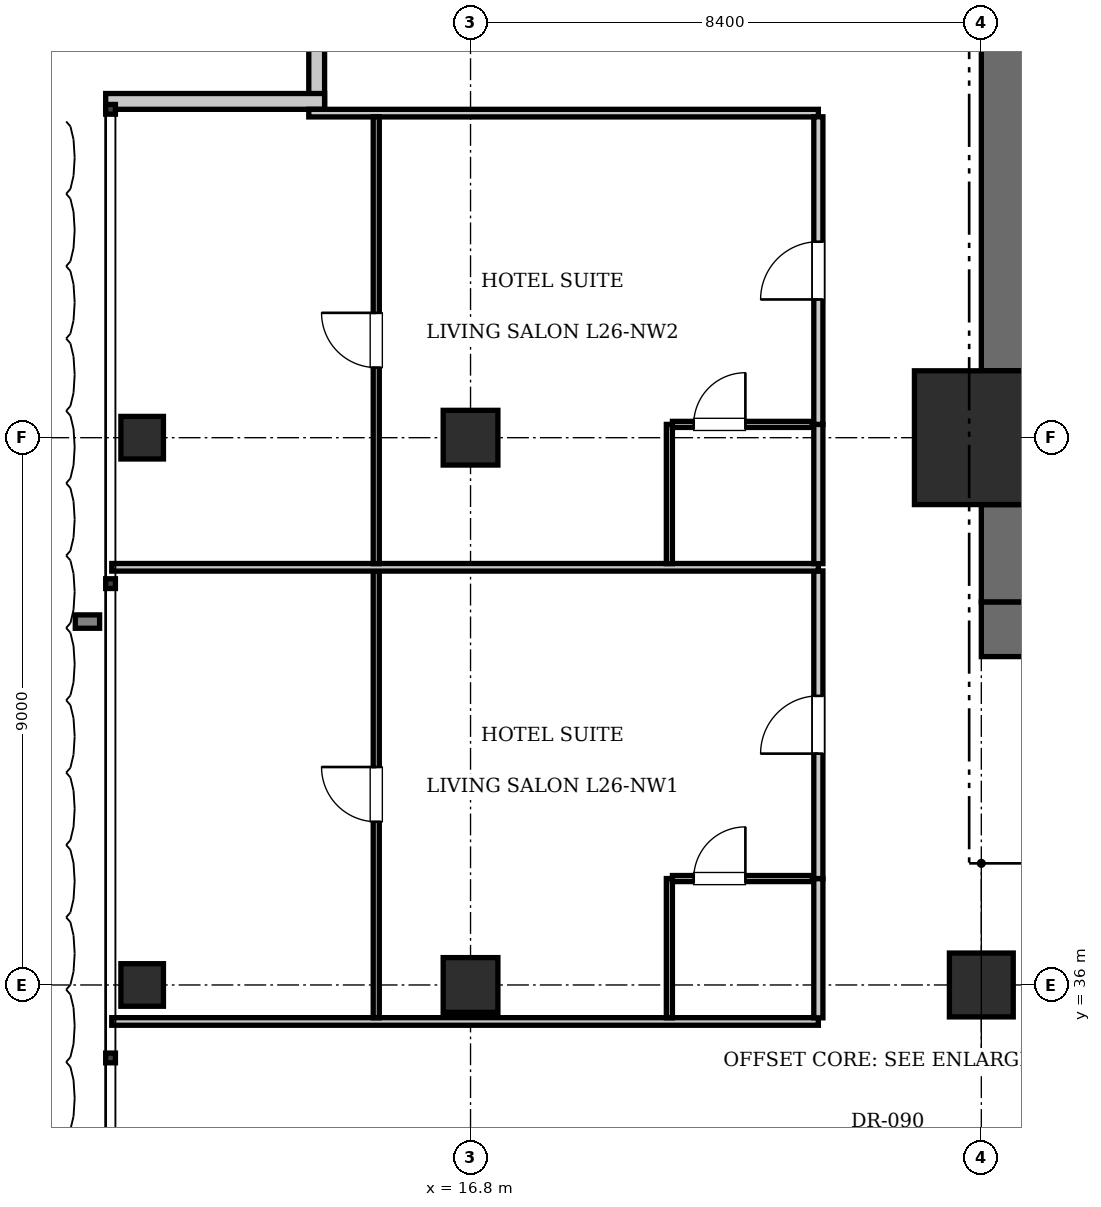
"""IFC4 building model, lengths in metres.
Left out: names, types, materials, properties, quantities, classifications, styles, units other than length and angle.
Written with IfcOpenShell. Run it as: python <this file> out.ifc"""

import sys

from ifc_helpers import new_model, si_unit, direction, frame, frame_2d, origin, origin_2d, place, context, subcontext, project, spatial, rectangle, i_section, extrude, element, fill, save


model = new_model("IFC4")
c1 = context("Model", 3, precision=1e-05, world=origin(), true_north=direction((0.0, 1.0)))
c2 = subcontext(c1, "Body", "Model", "MODEL_VIEW")
j1 = project(units=[si_unit("LENGTHUNIT", "METRE"), si_unit("PLANEANGLEUNIT", "RADIAN")], contexts=[c1])
p1 = place(None, origin())
s1 = spatial("IfcSite", under=j1, at=p1, CompositionType="ELEMENT")
p2 = place(p1, origin())
s2 = spatial("IfcBuilding", under=s1, at=p2, CompositionType="ELEMENT")
p3 = place(p2, frame((0.0, 0.0, 107.8)))
s3 = spatial("IfcBuildingStorey", under=s2, at=p3, CompositionType="ELEMENT", Elevation=107.8)
p4 = place(p3, frame((25.2, 45.0, 0.0), z_axis=(0.0, 0.0, 1.0), x_axis=(1.0, 0.0, 0.0)))
e1 = element("IfcColumn", 1, at=p4, inside=s3, PredefinedType="COLUMN", context=c2, shape_type="SweptSolid", body=[
    extrude(rectangle(XDim=2.2, YDim=2.2, at=origin_2d()), origin(), (0.0, 0.0, 1.0), 3.85),
])
p5 = place(p3, frame((25.2, 41.85, 0.0), z_axis=(0.0, 0.0, 1.0), x_axis=(1.0, 0.0, 0.0)))
e2 = element("IfcWall", 2, at=p5, inside=s3, PredefinedType="SHEAR", context=c2, shape_type="SweptSolid", body=[
    extrude(rectangle(XDim=6.8, YDim=0.9, at=frame_2d((3.4, 0.0))), origin(), (0.0, 0.0, 1.0), 3.85),
])
p6 = place(p5, frame((1.65, 0.0, 0.0)))
e3 = element("IfcOpeningElement", 3, at=p6, cuts=e2, PredefinedType="OPENING", context=c2, shape_type="SweptSolid", body=[
    extrude(rectangle(XDim=1.15, YDim=2.15, at=frame_2d((0.575, 1.075))), frame((0.0, 0.46, 0.0), z_axis=(0.0, -1.0, 0.0), x_axis=(1.0, 0.0, 0.0)), (0.0, 0.0, 1.0), 0.92),
])
p7 = place(p5, frame((5.15, 0.0, 0.0)))
e4 = element("IfcOpeningElement", 4, at=p7, cuts=e2, PredefinedType="OPENING", context=c2, shape_type="SweptSolid", body=[
    extrude(rectangle(XDim=1.1, YDim=2.2, at=frame_2d((0.55, 1.1))), frame((0.0, 0.46, 0.0), z_axis=(0.0, -1.0, 0.0), x_axis=(1.0, 0.0, 0.0)), (0.0, 0.0, 1.0), 0.92),
])
p8 = place(p3, frame((25.65, 42.3, 0.0), z_axis=(0.0, 0.0, 1.0), x_axis=(0.0, 1.0, 0.0)))
e5 = element("IfcWall", 5, at=p8, inside=s3, PredefinedType="SHEAR", context=c2, shape_type="SweptSolid", body=[
    extrude(rectangle(XDim=1.6, YDim=0.9, at=frame_2d((0.8, 0.0))), origin(), (0.0, 0.0, 1.0), 3.85),
])
p9 = place(p3, frame((25.65, 46.1, 0.0), z_axis=(0.0, 0.0, 1.0), x_axis=(0.0, 1.0, 0.0)))
e6 = element("IfcWall", 6, at=p9, inside=s3, PredefinedType="SHEAR", context=c2, shape_type="SweptSolid", body=[
    extrude(rectangle(XDim=7.0, YDim=0.9, at=frame_2d((3.5, 0.0))), origin(), (0.0, 0.0, 1.0), 3.85),
])
p10 = place(p3, frame((25.2, 36.0, 0.0), z_axis=(0.0, 0.0, 1.0), x_axis=(1.0, 0.0, 0.0)))
e7 = element("IfcColumn", 7, at=p10, inside=s3, PredefinedType="COLUMN", context=c2, shape_type="SweptSolid", body=[
    extrude(rectangle(XDim=1.05, YDim=1.05, at=origin_2d()), origin(), (0.0, 0.0, 1.0), 3.85),
])
for number, where, z_axis, x_axis in (
    (8, (16.8, 36.0, 0.0), (0.0, 0.0, 1.0), (1.0, 0.0, 0.0)),
    (9, (16.8, 45.0, 0.0), (0.0, 0.0, 1.0), (1.0, 0.0, 0.0)),
):
    element("IfcColumn", number, at=place(p3, frame(where, z_axis=z_axis, x_axis=x_axis)), inside=s3, PredefinedType="COLUMN", context=c2, shape_type="SweptSolid", body=[
        extrude(rectangle(XDim=0.9, YDim=0.9, at=origin_2d()), origin(), (0.0, 0.0, 1.0), 3.85),
    ])
for number, where, z_axis, x_axis in (
    (10, (11.4, 36.0, 0.0), (0.0, 0.0, 1.0), (1.0, 0.0, 0.0)),
    (11, (11.4, 45.0, 0.0), (0.0, 0.0, 1.0), (1.0, 0.0, 0.0)),
):
    element("IfcColumn", number, at=place(p3, frame(where, z_axis=z_axis, x_axis=x_axis)), inside=s3, PredefinedType="COLUMN", context=c2, shape_type="SweptSolid", body=[
        extrude(i_section(OverallWidth=0.7, OverallDepth=0.7, WebThickness=0.028, FlangeThickness=0.044, at=origin_2d()), origin(), (0.0, 0.0, 1.0), 3.85),
    ])
p11 = place(p3, frame((14.27, 50.4, 0.0), z_axis=(0.0, 0.0, 1.0), x_axis=(0.0, 1.0, 0.0)))
e12 = element("IfcWall", 12, at=p11, inside=s3, PredefinedType="SOLIDWALL", context=c2, shape_type="SweptSolid", body=[
    extrude(rectangle(XDim=3.6, YDim=0.26, at=frame_2d((1.8, 0.0))), origin(), (0.0, 0.0, 1.0), 3.61),
])
p12 = place(p3, frame((10.8, 50.53, 0.0), z_axis=(0.0, 0.0, 1.0), x_axis=(1.0, 0.0, 0.0)))
e13 = element("IfcWall", 13, at=p12, inside=s3, PredefinedType="SOLIDWALL", context=c2, shape_type="SweptSolid", body=[
    extrude(rectangle(XDim=3.6, YDim=0.26, at=frame_2d((1.8, 0.0))), origin(), (0.0, 0.0, 1.0), 3.61),
])
p13 = place(p3, frame((10.9, 35.4, 0.0), z_axis=(0.0, 0.0, 1.0), x_axis=(1.0, 0.0, 0.0)))
e14 = element("IfcWall", 14, at=p13, inside=s3, PredefinedType="PARTITIONING", context=c2, shape_type="SweptSolid", body=[
    extrude(rectangle(XDim=11.62, YDim=0.125, at=frame_2d((5.81, 0.0))), origin(), (0.0, 0.0, 1.0), 3.61),
])
p14 = place(p3, frame((14.14, 50.337, 0.0), z_axis=(0.0, 0.0, 1.0), x_axis=(1.0, 0.0, 0.0)))
e15 = element("IfcWall", 15, at=p14, inside=s3, PredefinedType="PARTITIONING", context=c2, shape_type="SweptSolid", body=[
    extrude(rectangle(XDim=8.38, YDim=0.125, at=frame_2d((4.19, 0.0))), origin(), (0.0, 0.0, 1.0), 3.61),
])
p15 = place(p3, frame((22.52, 35.46, 0.0), z_axis=(0.0, 0.0, 1.0), x_axis=(0.0, 1.0, 0.0)))
e16 = element("IfcWall", 16, at=p15, inside=s3, PredefinedType="PARTITIONING", context=c2, shape_type="SweptSolid", body=[
    extrude(rectangle(XDim=2.29, YDim=0.15, at=frame_2d((1.145, 0.0))), origin(), (0.0, 0.0, 1.0), 3.61),
])
p16 = place(p3, frame((22.52, 37.75, 0.0), z_axis=(0.0, 0.0, 1.0), x_axis=(0.0, 1.0, 0.0)))
e17 = element("IfcWall", 17, at=p16, inside=s3, PredefinedType="PARTITIONING", context=c2, shape_type="SweptSolid", body=[
    extrude(rectangle(XDim=5.059, YDim=0.15, at=frame_2d((2.529, 0.0))), origin(), (0.0, 0.0, 1.0), 3.61),
])
p17 = place(p16, frame((2.054, 0.0, 0.0)))
e18 = element("IfcOpeningElement", 18, at=p17, cuts=e17, PredefinedType="OPENING", context=c2, shape_type="SweptSolid", body=[
    extrude(rectangle(XDim=0.95, YDim=2.15, at=frame_2d((0.475, 1.075))), frame((0.0, 0.085, 0.0), z_axis=(0.0, -1.0, 0.0), x_axis=(1.0, 0.0, 0.0)), (0.0, 0.0, 1.0), 0.17),
])
p18 = place(p3, frame((20.07, 35.46, 0.0), z_axis=(0.0, 0.0, 1.0), x_axis=(0.0, 1.0, 0.0)))
e19 = element("IfcWall", 19, at=p18, inside=s3, PredefinedType="PARTITIONING", context=c2, shape_type="SweptSolid", body=[
    extrude(rectangle(XDim=2.29, YDim=0.1, at=frame_2d((1.145, 0.0))), origin(), (0.0, 0.0, 1.0), 3.61),
])
p19 = place(p3, frame((20.12, 37.75, 0.0), z_axis=(0.0, 0.0, 1.0), x_axis=(1.0, 0.0, 0.0)))
e20 = element("IfcWall", 20, at=p19, inside=s3, PredefinedType="PARTITIONING", context=c2, shape_type="SweptSolid", body=[
    extrude(rectangle(XDim=2.3, YDim=0.1, at=frame_2d((1.15, 0.0))), origin(), (0.0, 0.0, 1.0), 3.61),
])
p20 = place(p19, frame((0.35, 0.0, 0.0)))
e21 = element("IfcOpeningElement", 21, at=p20, cuts=e20, PredefinedType="OPENING", context=c2, shape_type="SweptSolid", body=[
    extrude(rectangle(XDim=0.85, YDim=2.1, at=frame_2d((0.425, 1.05))), frame((0.0, 0.06, 0.0), z_axis=(0.0, -1.0, 0.0), x_axis=(1.0, 0.0, 0.0)), (0.0, 0.0, 1.0), 0.12),
])
p21 = place(p3, frame((15.25, 35.46, 0.0), z_axis=(0.0, 0.0, 1.0), x_axis=(0.0, 1.0, 0.0)))
e22 = element("IfcWall", 22, at=p21, inside=s3, PredefinedType="PARTITIONING", context=c2, shape_type="SweptSolid", body=[
    extrude(rectangle(XDim=7.349, YDim=0.1, at=frame_2d((3.674, 0.0))), origin(), (0.0, 0.0, 1.0), 3.61),
])
p22 = place(p21, frame((3.224, 0.0, 0.0)))
e23 = element("IfcOpeningElement", 23, at=p22, cuts=e22, PredefinedType="OPENING", context=c2, shape_type="SweptSolid", body=[
    extrude(rectangle(XDim=0.9, YDim=2.1, at=frame_2d((0.45, 1.05))), frame((0.0, 0.06, 0.0), z_axis=(0.0, -1.0, 0.0), x_axis=(1.0, 0.0, 0.0)), (0.0, 0.0, 1.0), 0.12),
])
p23 = place(p3, frame((10.9, 42.869, 0.0), z_axis=(0.0, 0.0, 1.0), x_axis=(1.0, 0.0, 0.0)))
e24 = element("IfcWall", 24, at=p23, inside=s3, PredefinedType="PARTITIONING", context=c2, shape_type="SweptSolid", body=[
    extrude(rectangle(XDim=11.62, YDim=0.125, at=frame_2d((5.81, 0.0))), origin(), (0.0, 0.0, 1.0), 3.61),
])
p24 = place(p3, frame((22.52, 42.929, 0.0), z_axis=(0.0, 0.0, 1.0), x_axis=(0.0, 1.0, 0.0)))
e25 = element("IfcWall", 25, at=p24, inside=s3, PredefinedType="PARTITIONING", context=c2, shape_type="SweptSolid", body=[
    extrude(rectangle(XDim=2.29, YDim=0.15, at=frame_2d((1.145, 0.0))), origin(), (0.0, 0.0, 1.0), 3.61),
])
p25 = place(p3, frame((22.52, 45.219, 0.0), z_axis=(0.0, 0.0, 1.0), x_axis=(0.0, 1.0, 0.0)))
e26 = element("IfcWall", 26, at=p25, inside=s3, PredefinedType="PARTITIONING", context=c2, shape_type="SweptSolid", body=[
    extrude(rectangle(XDim=5.059, YDim=0.15, at=frame_2d((2.529, 0.0))), origin(), (0.0, 0.0, 1.0), 3.61),
])
p26 = place(p25, frame((2.054, 0.0, 0.0)))
e27 = element("IfcOpeningElement", 27, at=p26, cuts=e26, PredefinedType="OPENING", context=c2, shape_type="SweptSolid", body=[
    extrude(rectangle(XDim=0.95, YDim=2.15, at=frame_2d((0.475, 1.075))), frame((0.0, 0.085, 0.0), z_axis=(0.0, -1.0, 0.0), x_axis=(1.0, 0.0, 0.0)), (0.0, 0.0, 1.0), 0.17),
])
p27 = place(p3, frame((20.07, 42.929, 0.0), z_axis=(0.0, 0.0, 1.0), x_axis=(0.0, 1.0, 0.0)))
e28 = element("IfcWall", 28, at=p27, inside=s3, PredefinedType="PARTITIONING", context=c2, shape_type="SweptSolid", body=[
    extrude(rectangle(XDim=2.29, YDim=0.1, at=frame_2d((1.145, 0.0))), origin(), (0.0, 0.0, 1.0), 3.61),
])
p28 = place(p3, frame((20.12, 45.219, 0.0), z_axis=(0.0, 0.0, 1.0), x_axis=(1.0, 0.0, 0.0)))
e29 = element("IfcWall", 29, at=p28, inside=s3, PredefinedType="PARTITIONING", context=c2, shape_type="SweptSolid", body=[
    extrude(rectangle(XDim=2.3, YDim=0.1, at=frame_2d((1.15, 0.0))), origin(), (0.0, 0.0, 1.0), 3.61),
])
p29 = place(p28, frame((0.35, 0.0, 0.0)))
e30 = element("IfcOpeningElement", 30, at=p29, cuts=e29, PredefinedType="OPENING", context=c2, shape_type="SweptSolid", body=[
    extrude(rectangle(XDim=0.85, YDim=2.1, at=frame_2d((0.425, 1.05))), frame((0.0, 0.06, 0.0), z_axis=(0.0, -1.0, 0.0), x_axis=(1.0, 0.0, 0.0)), (0.0, 0.0, 1.0), 0.12),
])
p30 = place(p3, frame((15.25, 42.929, 0.0), z_axis=(0.0, 0.0, 1.0), x_axis=(0.0, 1.0, 0.0)))
e31 = element("IfcWall", 31, at=p30, inside=s3, PredefinedType="PARTITIONING", context=c2, shape_type="SweptSolid", body=[
    extrude(rectangle(XDim=7.349, YDim=0.1, at=frame_2d((3.674, 0.0))), origin(), (0.0, 0.0, 1.0), 3.61),
])
p31 = place(p30, frame((3.224, 0.0, 0.0)))
e32 = element("IfcOpeningElement", 32, at=p31, cuts=e31, PredefinedType="OPENING", context=c2, shape_type="SweptSolid", body=[
    extrude(rectangle(XDim=0.9, YDim=2.1, at=frame_2d((0.45, 1.05))), frame((0.0, 0.06, 0.0), z_axis=(0.0, -1.0, 0.0), x_axis=(1.0, 0.0, 0.0)), (0.0, 0.0, 1.0), 0.12),
])
p32 = place(p20, origin())
e33 = element("IfcDoor", 33, at=p32, inside=s3, OperationType="SINGLE_SWING_RIGHT", PredefinedType="DOOR", context=c2, shape_type="SweptSolid", body=[
    extrude(rectangle(XDim=0.85, YDim=2.1, at=frame_2d((0.425, 1.05))), frame((0.0, 0.025, 0.0), z_axis=(0.0, -1.0, 0.0), x_axis=(1.0, 0.0, 0.0)), (0.0, 0.0, 1.0), 0.05),
])
fill(e21, e33)
p33 = place(p17, origin())
e34 = element("IfcDoor", 34, at=p33, inside=s3, OperationType="SINGLE_SWING_LEFT", PredefinedType="DOOR", context=c2, shape_type="SweptSolid", body=[
    extrude(rectangle(XDim=0.95, YDim=2.15, at=frame_2d((0.475, 1.075))), frame((0.0, 0.025, 0.0), z_axis=(0.0, -1.0, 0.0), x_axis=(1.0, 0.0, 0.0)), (0.0, 0.0, 1.0), 0.05),
])
fill(e18, e34)
p34 = place(p22, origin())
e35 = element("IfcDoor", 35, at=p34, inside=s3, OperationType="SINGLE_SWING_RIGHT", PredefinedType="DOOR", context=c2, shape_type="SweptSolid", body=[
    extrude(rectangle(XDim=0.9, YDim=2.1, at=frame_2d((0.45, 1.05))), frame((0.0, 0.025, 0.0), z_axis=(0.0, -1.0, 0.0), x_axis=(1.0, 0.0, 0.0)), (0.0, 0.0, 1.0), 0.05),
])
fill(e23, e35)
p35 = place(p29, origin())
e36 = element("IfcDoor", 36, at=p35, inside=s3, OperationType="SINGLE_SWING_RIGHT", PredefinedType="DOOR", context=c2, shape_type="SweptSolid", body=[
    extrude(rectangle(XDim=0.85, YDim=2.1, at=frame_2d((0.425, 1.05))), frame((0.0, 0.025, 0.0), z_axis=(0.0, -1.0, 0.0), x_axis=(1.0, 0.0, 0.0)), (0.0, 0.0, 1.0), 0.05),
])
fill(e30, e36)
p36 = place(p26, origin())
e37 = element("IfcDoor", 37, at=p36, inside=s3, OperationType="SINGLE_SWING_LEFT", PredefinedType="DOOR", context=c2, shape_type="SweptSolid", body=[
    extrude(rectangle(XDim=0.95, YDim=2.15, at=frame_2d((0.475, 1.075))), frame((0.0, 0.025, 0.0), z_axis=(0.0, -1.0, 0.0), x_axis=(1.0, 0.0, 0.0)), (0.0, 0.0, 1.0), 0.05),
])
fill(e27, e37)
p37 = place(p31, origin())
e38 = element("IfcDoor", 38, at=p37, inside=s3, OperationType="SINGLE_SWING_RIGHT", PredefinedType="DOOR", context=c2, shape_type="SweptSolid", body=[
    extrude(rectangle(XDim=0.9, YDim=2.1, at=frame_2d((0.45, 1.05))), frame((0.0, 0.025, 0.0), z_axis=(0.0, -1.0, 0.0), x_axis=(1.0, 0.0, 0.0)), (0.0, 0.0, 1.0), 0.05),
])
fill(e32, e38)
save(model, sys.argv[1])
